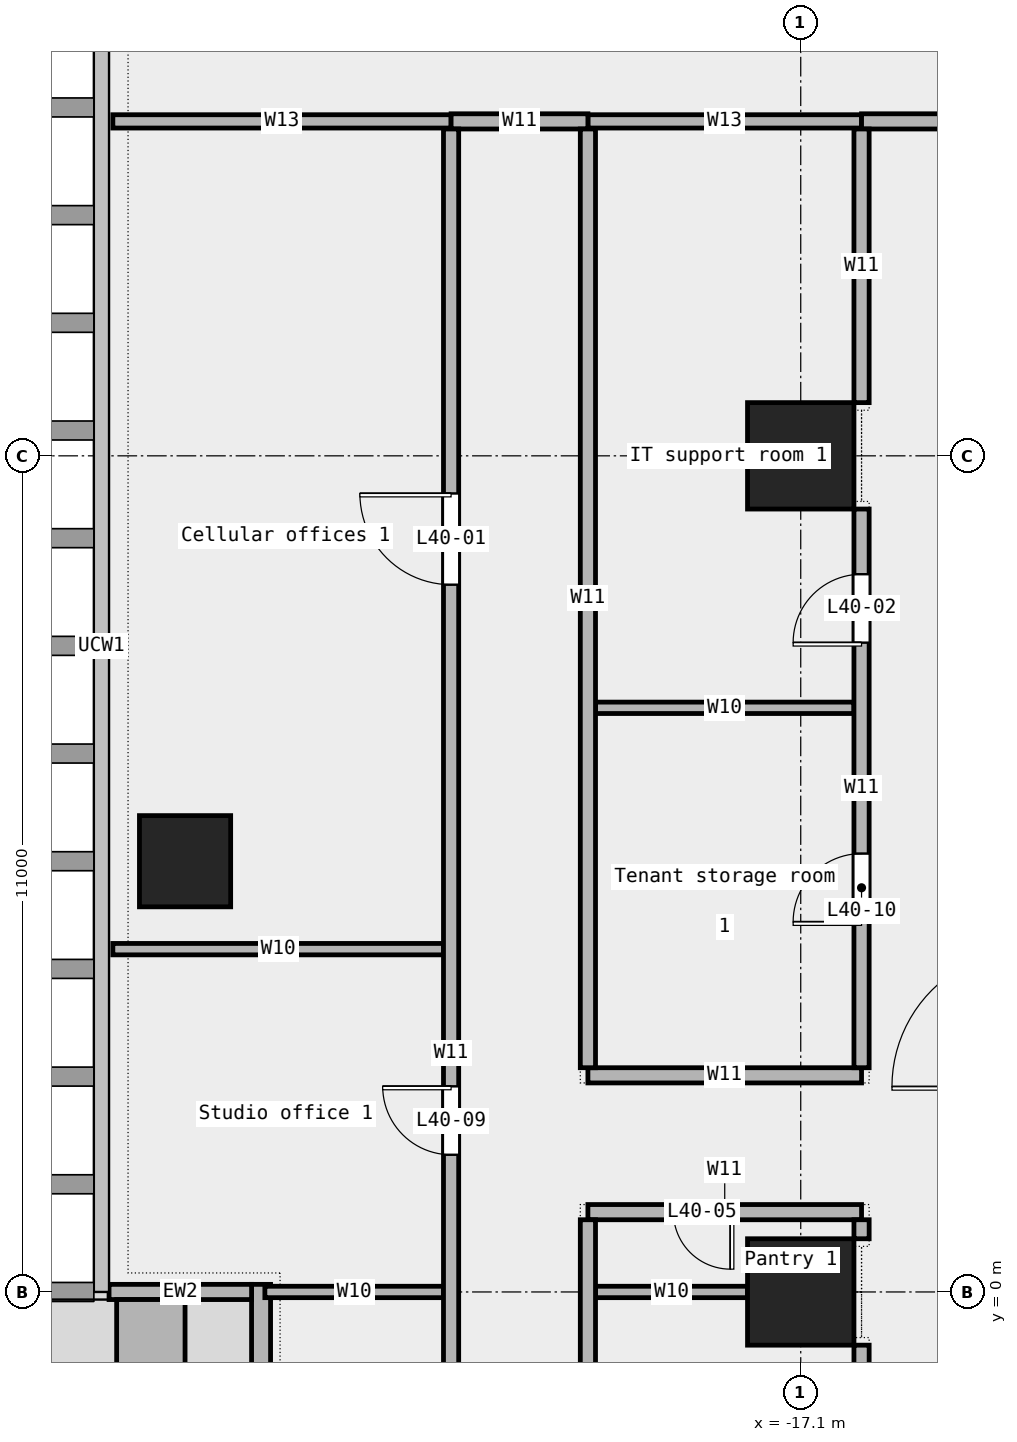
"""IFC4 building model, lengths in metres.
Left out: names, types, materials, properties, quantities, classifications, styles, units other than length and angle.
Written with IfcOpenShell. Run it as: python <this file> out.ifc"""

import sys

from ifc_helpers import new_model, si_unit, direction, frame, frame_2d, origin, origin_2d, place, context, subcontext, project, spatial, rectangle, extrude, element, fill, save


model = new_model("IFC4")
c1 = context("Model", 3, precision=1e-05, world=origin(), true_north=direction((0.0, 1.0)))
c2 = subcontext(c1, "Body", "Model", "MODEL_VIEW")
j1 = project(units=[si_unit("LENGTHUNIT", "METRE"), si_unit("PLANEANGLEUNIT", "RADIAN")], contexts=[c1])
p1 = place(None, origin())
s1 = spatial("IfcSite", under=j1, at=p1, CompositionType="ELEMENT")
p2 = place(p1, origin())
s2 = spatial("IfcBuilding", under=s1, at=p2, CompositionType="ELEMENT")
p3 = place(p2, frame((0.0, 0.0, 193.0)))
s3 = spatial("IfcBuildingStorey", under=s2, at=p3, CompositionType="ELEMENT", Elevation=193.0)
p4 = place(p3, frame((-25.2, 5.667, 0.0), z_axis=(0.0, 0.0, 1.0), x_axis=(1.0, 0.0, 0.0)))
e1 = element("IfcColumn", 1, at=p4, inside=s3, PredefinedType="COLUMN", context=c2, shape_type="SweptSolid", body=[
    extrude(rectangle(XDim=1.2, YDim=1.2, at=origin_2d()), origin(), (0.0, 0.0, 1.0), 3.6),
])
for number, where, z_axis, x_axis in (
    (2, (-17.1, 0.0, 0.0), (0.0, 0.0, 1.0), (1.0, 0.0, 0.0)),
    (3, (-17.1, 11.0, 0.0), (0.0, 0.0, 1.0), (1.0, 0.0, 0.0)),
):
    element("IfcColumn", number, at=place(p3, frame(where, z_axis=z_axis, x_axis=x_axis)), inside=s3, PredefinedType="COLUMN", context=c2, shape_type="SweptSolid", body=[
        extrude(rectangle(XDim=1.4, YDim=1.4, at=origin_2d()), origin(), (0.0, 0.0, 1.0), 3.6),
    ])
p5 = place(p3, frame((-24.2, 0.1, 0.0), z_axis=(0.0, 0.0, 1.0), x_axis=(0.0, -1.0, 0.0)))
e4 = element("IfcWall", 4, at=p5, inside=s3, PredefinedType="STANDARD", context=c2, shape_type="SweptSolid", body=[
    extrude(rectangle(XDim=12.95, YDim=0.25, at=frame_2d((6.475, 0.0))), origin(), (0.0, 0.0, 1.0), 3.6),
])
p6 = place(p5, frame((1.5, 0.0, 0.45)))
e5 = element("IfcOpeningElement", 5, at=p6, cuts=e4, PredefinedType="OPENING", context=c2, shape_type="SweptSolid", body=[
    extrude(rectangle(XDim=1.5, YDim=2.4, at=frame_2d((0.75, 1.2))), frame((0.0, 0.137, 0.0), z_axis=(0.0, -1.0, 0.0), x_axis=(1.0, 0.0, 0.0)), (0.0, 0.0, 1.0), 0.274),
])
p7 = place(p5, frame((6.75, 0.0, 0.0)))
e6 = element("IfcOpeningElement", 6, at=p7, cuts=e4, PredefinedType="OPENING", context=c2, shape_type="SweptSolid", body=[
    extrude(rectangle(XDim=1.8, YDim=2.4, at=frame_2d((0.9, 1.2))), frame((0.0, 0.137, 0.0), z_axis=(0.0, -1.0, 0.0), x_axis=(1.0, 0.0, 0.0)), (0.0, 0.0, 1.0), 0.274),
])
p8 = place(p5, frame((10.0, 0.0, 0.45)))
e7 = element("IfcOpeningElement", 7, at=p8, cuts=e4, PredefinedType="OPENING", context=c2, shape_type="SweptSolid", body=[
    extrude(rectangle(XDim=1.5, YDim=2.4, at=frame_2d((0.75, 1.2))), frame((0.0, 0.137, 0.0), z_axis=(0.0, -1.0, 0.0), x_axis=(1.0, 0.0, 0.0)), (0.0, 0.0, 1.0), 0.274),
])
p9 = place(p3, frame((-26.2, 0.0, 0.0), z_axis=(0.0, 0.0, 1.0), x_axis=(1.0, 0.0, 0.0)))
e8 = element("IfcWall", 8, at=p9, inside=s3, PredefinedType="STANDARD", context=c2, shape_type="SweptSolid", body=[
    extrude(rectangle(XDim=1.875, YDim=0.2, at=frame_2d((0.938, 0.0))), origin(), (0.0, 0.0, 1.0), 3.6),
])
p10 = place(p3, frame((-25.65, -0.1, 0.0), z_axis=(0.0, 0.0, 1.0), x_axis=(0.0, -1.0, 0.0)))
e9 = element("IfcWall", 9, at=p10, inside=s3, PredefinedType="STANDARD", context=c2, shape_type="SweptSolid", body=[
    extrude(rectangle(XDim=3.6, YDim=0.9, at=frame_2d((1.8, 0.0))), origin(), (0.0, 0.0, 1.0), 0.7),
])
p11 = place(p3, frame((-24.15, 0.0, 0.0), z_axis=(0.0, 0.0, 1.0), x_axis=(1.0, 0.0, 0.0)))
e10 = element("IfcWall", 10, at=p11, inside=s3, PredefinedType="PARTITIONING", context=c2, shape_type="SweptSolid", body=[
    extrude(rectangle(XDim=2.35, YDim=0.15, at=frame_2d((1.175, 0.0))), origin(), (0.0, 0.0, 1.0), 3.6),
])
p12 = place(p3, frame((-19.8, 0.0, 0.0), z_axis=(0.0, 0.0, 1.0), x_axis=(1.0, 0.0, 0.0)))
e11 = element("IfcWall", 11, at=p12, inside=s3, PredefinedType="PARTITIONING", context=c2, shape_type="SweptSolid", body=[
    extrude(rectangle(XDim=2.0, YDim=0.15, at=frame_2d((1.0, 0.0))), origin(), (0.0, 0.0, 1.0), 3.6),
])
p13 = place(p3, frame((-19.9, 1.05, 0.0), z_axis=(0.0, 0.0, 1.0), x_axis=(1.0, 0.0, 0.0)))
e12 = element("IfcWall", 12, at=p13, inside=s3, PredefinedType="PARTITIONING", context=c2, shape_type="SweptSolid", body=[
    extrude(rectangle(XDim=3.6, YDim=0.2, at=frame_2d((1.8, 0.0))), origin(), (0.0, 0.0, 1.0), 3.6),
])
p14 = place(p13, frame((1.125, 0.0, 0.0)))
e13 = element("IfcOpeningElement", 13, at=p14, cuts=e12, PredefinedType="OPENING", context=c2, shape_type="SweptSolid", body=[
    extrude(rectangle(XDim=0.75, YDim=2.1, at=frame_2d((0.375, 1.05))), frame((0.0, 0.112, 0.0), z_axis=(0.0, -1.0, 0.0), x_axis=(1.0, 0.0, 0.0)), (0.0, 0.0, 1.0), 0.224),
])
p15 = place(p3, frame((-19.9, 2.85, 0.0), z_axis=(0.0, 0.0, 1.0), x_axis=(1.0, 0.0, 0.0)))
e14 = element("IfcWall", 14, at=p15, inside=s3, PredefinedType="PARTITIONING", context=c2, shape_type="SweptSolid", body=[
    extrude(rectangle(XDim=3.6, YDim=0.2, at=frame_2d((1.8, 0.0))), origin(), (0.0, 0.0, 1.0), 3.6),
])
p16 = place(p3, frame((-26.15, 4.51, 0.0), z_axis=(0.0, 0.0, 1.0), x_axis=(1.0, 0.0, 0.0)))
e15 = element("IfcWall", 15, at=p16, inside=s3, PredefinedType="PARTITIONING", context=c2, shape_type="SweptSolid", body=[
    extrude(rectangle(XDim=4.35, YDim=0.15, at=frame_2d((2.175, 0.0))), origin(), (0.0, 0.0, 1.0), 3.6),
])
p17 = place(p3, frame((-19.8, 7.685, 0.0), z_axis=(0.0, 0.0, 1.0), x_axis=(1.0, 0.0, 0.0)))
e16 = element("IfcWall", 16, at=p17, inside=s3, PredefinedType="PARTITIONING", context=c2, shape_type="SweptSolid", body=[
    extrude(rectangle(XDim=3.4, YDim=0.15, at=frame_2d((1.7, 0.0))), origin(), (0.0, 0.0, 1.0), 3.6),
])
p18 = place(p3, frame((-26.15, 15.4, 0.0), z_axis=(0.0, 0.0, 1.0), x_axis=(1.0, 0.0, 0.0)))
e17 = element("IfcWall", 17, at=p18, inside=s3, PredefinedType="PARTITIONING", context=c2, shape_type="SweptSolid", body=[
    extrude(rectangle(XDim=4.45, YDim=0.175, at=frame_2d((2.225, 0.0))), origin(), (0.0, 0.0, 1.0), 3.6),
])
p19 = place(p3, frame((-19.9, 15.4, 0.0), z_axis=(0.0, 0.0, 1.0), x_axis=(1.0, 0.0, 0.0)))
e18 = element("IfcWall", 18, at=p19, inside=s3, PredefinedType="PARTITIONING", context=c2, shape_type="SweptSolid", body=[
    extrude(rectangle(XDim=3.6, YDim=0.175, at=frame_2d((1.8, 0.0))), origin(), (0.0, 0.0, 1.0), 3.6),
])
p20 = place(p3, frame((-21.7, 15.4, 0.0), z_axis=(0.0, 0.0, 1.0), x_axis=(1.0, 0.0, 0.0)))
e19 = element("IfcWall", 19, at=p20, inside=s3, PredefinedType="PARTITIONING", context=c2, shape_type="SweptSolid", body=[
    extrude(rectangle(XDim=1.8, YDim=0.2, at=frame_2d((0.9, 0.0))), origin(), (0.0, 0.0, 1.0), 3.6),
])
p21 = place(p3, frame((-16.3, 15.4, 0.0), z_axis=(0.0, 0.0, 1.0), x_axis=(1.0, 0.0, 0.0)))
e20 = element("IfcWall", 20, at=p21, inside=s3, PredefinedType="PARTITIONING", context=c2, shape_type="SweptSolid", body=[
    extrude(rectangle(XDim=32.6, YDim=0.2, at=frame_2d((16.3, 0.0))), origin(), (0.0, 0.0, 1.0), 3.6),
])
p22 = place(p21, frame((10.185, 0.0, 0.0)))
e21 = element("IfcOpeningElement", 21, at=p22, cuts=e20, PredefinedType="OPENING", context=c2, shape_type="SweptSolid", body=[
    extrude(rectangle(XDim=1.5, YDim=2.1, at=frame_2d((0.75, 1.05))), frame((0.0, 0.112, 0.0), z_axis=(0.0, -1.0, 0.0), x_axis=(1.0, 0.0, 0.0)), (0.0, 0.0, 1.0), 0.224),
])
p23 = place(p21, frame((1.062, 0.0, 0.0)))
e22 = element("IfcOpeningElement", 22, at=p23, cuts=e20, PredefinedType="OPENING", context=c2, shape_type="SweptSolid", body=[
    extrude(rectangle(XDim=1.2, YDim=2.1, at=frame_2d((0.6, 1.05))), frame((0.0, 0.112, 0.0), z_axis=(0.0, -1.0, 0.0), x_axis=(1.0, 0.0, 0.0)), (0.0, 0.0, 1.0), 0.224),
])
p24 = place(p21, frame((24.677, 0.0, 0.0)))
e23 = element("IfcOpeningElement", 23, at=p24, cuts=e20, PredefinedType="OPENING", context=c2, shape_type="SweptSolid", body=[
    extrude(rectangle(XDim=1.2, YDim=2.1, at=frame_2d((0.6, 1.05))), frame((0.0, 0.112, 0.0), z_axis=(0.0, -1.0, 0.0), x_axis=(1.0, 0.0, 0.0)), (0.0, 0.0, 1.0), 0.224),
])
p25 = place(p3, frame((-21.7, -9.0, 0.0), z_axis=(0.0, 0.0, 1.0), x_axis=(0.0, 1.0, 0.0)))
e24 = element("IfcWall", 24, at=p25, inside=s3, PredefinedType="PARTITIONING", context=c2, shape_type="SweptSolid", body=[
    extrude(rectangle(XDim=24.3, YDim=0.2, at=frame_2d((12.15, 0.0))), origin(), (0.0, 0.0, 1.0), 3.6),
])
p26 = place(p25, frame((18.305, 0.0, 0.0)))
e25 = element("IfcOpeningElement", 25, at=p26, cuts=e24, PredefinedType="OPENING", context=c2, shape_type="SweptSolid", body=[
    extrude(rectangle(XDim=1.2, YDim=2.1, at=frame_2d((0.6, 1.05))), frame((0.0, 0.112, 0.0), z_axis=(0.0, -1.0, 0.0), x_axis=(1.0, 0.0, 0.0)), (0.0, 0.0, 1.0), 0.224),
])
p27 = place(p25, frame((10.805, 0.0, 0.0)))
e26 = element("IfcOpeningElement", 26, at=p27, cuts=e24, PredefinedType="OPENING", context=c2, shape_type="SweptSolid", body=[
    extrude(rectangle(XDim=0.9, YDim=2.1, at=frame_2d((0.45, 1.05))), frame((0.0, 0.112, 0.0), z_axis=(0.0, -1.0, 0.0), x_axis=(1.0, 0.0, 0.0)), (0.0, 0.0, 1.0), 0.224),
])
p28 = place(p3, frame((-19.9, -9.0, 0.0), z_axis=(0.0, 0.0, 1.0), x_axis=(0.0, 1.0, 0.0)))
e27 = element("IfcWall", 27, at=p28, inside=s3, PredefinedType="PARTITIONING", context=c2, shape_type="SweptSolid", body=[
    extrude(rectangle(XDim=9.95, YDim=0.2, at=frame_2d((4.975, 0.0))), origin(), (0.0, 0.0, 1.0), 3.6),
])
p29 = place(p3, frame((-19.9, 2.95, 0.0), z_axis=(0.0, 0.0, 1.0), x_axis=(0.0, 1.0, 0.0)))
e28 = element("IfcWall", 28, at=p29, inside=s3, PredefinedType="PARTITIONING", context=c2, shape_type="SweptSolid", body=[
    extrude(rectangle(XDim=12.35, YDim=0.2, at=frame_2d((6.175, 0.0))), origin(), (0.0, 0.0, 1.0), 3.6),
])
p30 = place(p3, frame((-16.3, -9.0, 0.0), z_axis=(0.0, 0.0, 1.0), x_axis=(0.0, 1.0, 0.0)))
e29 = element("IfcWall", 29, at=p30, inside=s3, PredefinedType="PARTITIONING", context=c2, shape_type="SweptSolid", body=[
    extrude(rectangle(XDim=8.3, YDim=0.2, at=frame_2d((4.15, 0.0))), origin(), (0.0, 0.0, 1.0), 3.6),
])
p31 = place(p3, frame((-16.3, 0.7, 0.0), z_axis=(0.0, 0.0, 1.0), x_axis=(0.0, 1.0, 0.0)))
e30 = element("IfcWall", 30, at=p31, inside=s3, PredefinedType="PARTITIONING", context=c2, shape_type="SweptSolid", body=[
    extrude(rectangle(XDim=0.25, YDim=0.2, at=frame_2d((0.125, 0.0))), origin(), (0.0, 0.0, 1.0), 3.6),
])
p32 = place(p3, frame((-16.3, 2.95, 0.0), z_axis=(0.0, 0.0, 1.0), x_axis=(0.0, 1.0, 0.0)))
e31 = element("IfcWall", 31, at=p32, inside=s3, PredefinedType="PARTITIONING", context=c2, shape_type="SweptSolid", body=[
    extrude(rectangle(XDim=7.35, YDim=0.2, at=frame_2d((3.675, 0.0))), origin(), (0.0, 0.0, 1.0), 3.6),
])
p33 = place(p32, frame((5.593, 0.0, 0.0)))
e32 = element("IfcOpeningElement", 32, at=p33, cuts=e31, PredefinedType="OPENING", context=c2, shape_type="SweptSolid", body=[
    extrude(rectangle(XDim=0.9, YDim=2.1, at=frame_2d((0.45, 1.05))), frame((0.0, 0.112, 0.0), z_axis=(0.0, -1.0, 0.0), x_axis=(1.0, 0.0, 0.0)), (0.0, 0.0, 1.0), 0.224),
])
p34 = place(p32, frame((1.917, 0.0, 0.0)))
e33 = element("IfcOpeningElement", 33, at=p34, cuts=e31, PredefinedType="OPENING", context=c2, shape_type="SweptSolid", body=[
    extrude(rectangle(XDim=0.9, YDim=2.1, at=frame_2d((0.45, 1.05))), frame((0.0, 0.112, 0.0), z_axis=(0.0, -1.0, 0.0), x_axis=(1.0, 0.0, 0.0)), (0.0, 0.0, 1.0), 0.224),
])
p35 = place(p3, frame((-16.3, 11.7, 0.0), z_axis=(0.0, 0.0, 1.0), x_axis=(0.0, 1.0, 0.0)))
e34 = element("IfcWall", 34, at=p35, inside=s3, PredefinedType="PARTITIONING", context=c2, shape_type="SweptSolid", body=[
    extrude(rectangle(XDim=3.6, YDim=0.2, at=frame_2d((1.8, 0.0))), origin(), (0.0, 0.0, 1.0), 3.6),
])
p36 = place(p26, origin())
e35 = element("IfcDoor", 35, at=p36, inside=s3, OperationType="SINGLE_SWING_RIGHT", PredefinedType="DOOR", context=c2, shape_type="SweptSolid", body=[
    extrude(rectangle(XDim=1.2, YDim=2.1, at=frame_2d((0.6, 1.05))), frame((0.0, 0.025, 0.0), z_axis=(0.0, -1.0, 0.0), x_axis=(1.0, 0.0, 0.0)), (0.0, 0.0, 1.0), 0.05),
])
fill(e25, e35)
p37 = place(p33, origin())
e36 = element("IfcDoor", 36, at=p37, inside=s3, OperationType="SINGLE_SWING_LEFT", PredefinedType="DOOR", context=c2, shape_type="SweptSolid", body=[
    extrude(rectangle(XDim=0.9, YDim=2.1, at=frame_2d((0.45, 1.05))), frame((0.0, 0.025, 0.0), z_axis=(0.0, -1.0, 0.0), x_axis=(1.0, 0.0, 0.0)), (0.0, 0.0, 1.0), 0.05),
])
fill(e32, e36)
p38 = place(p14, origin())
e37 = element("IfcDoor", 37, at=p38, inside=s3, OperationType="SINGLE_SWING_LEFT", PredefinedType="DOOR", context=c2, shape_type="SweptSolid", body=[
    extrude(rectangle(XDim=0.75, YDim=2.1, at=frame_2d((0.375, 1.05))), frame((0.0, 0.025, 0.0), z_axis=(0.0, -1.0, 0.0), x_axis=(1.0, 0.0, 0.0)), (0.0, 0.0, 1.0), 0.05),
])
fill(e13, e37)
p39 = place(p27, origin())
e38 = element("IfcDoor", 38, at=p39, inside=s3, OperationType="SINGLE_SWING_RIGHT", PredefinedType="DOOR", context=c2, shape_type="SweptSolid", body=[
    extrude(rectangle(XDim=0.9, YDim=2.1, at=frame_2d((0.45, 1.05))), frame((0.0, 0.025, 0.0), z_axis=(0.0, -1.0, 0.0), x_axis=(1.0, 0.0, 0.0)), (0.0, 0.0, 1.0), 0.05),
])
fill(e26, e38)
p40 = place(p34, origin())
e39 = element("IfcDoor", 39, at=p40, inside=s3, OperationType="SINGLE_SWING_LEFT", PredefinedType="DOOR", context=c2, shape_type="SweptSolid", body=[
    extrude(rectangle(XDim=0.9, YDim=2.1, at=frame_2d((0.45, 1.05))), frame((0.0, 0.025, 0.0), z_axis=(0.0, -1.0, 0.0), x_axis=(1.0, 0.0, 0.0)), (0.0, 0.0, 1.0), 0.05),
])
fill(e33, e39)
save(model, sys.argv[1])
